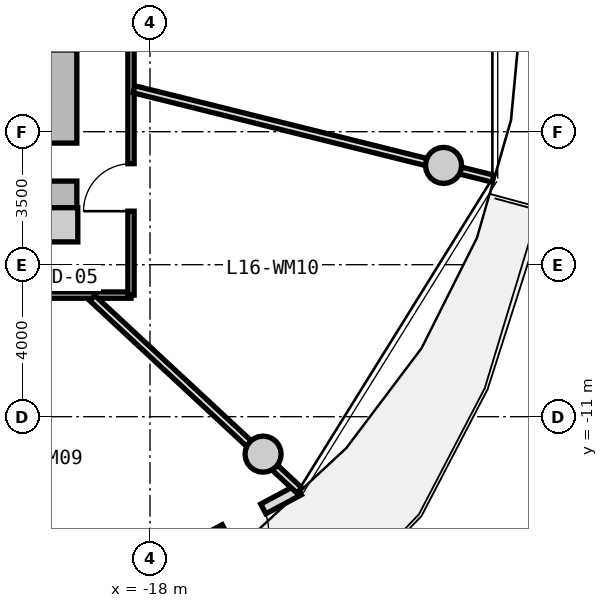
"""IFC4 building model, lengths in metres.
Left out: names, types, materials, properties, quantities, classifications, styles, units other than length and angle.
Written with IfcOpenShell. Run it as: python <this file> out.ifc"""

import sys

from ifc_helpers import new_model, si_unit, direction, frame, frame_2d, origin, origin_2d, place, context, subcontext, project, spatial, rectangle, circle, extrude, source, transform, mapped, element, fill, save


model = new_model("IFC4")
c1 = context("Model", 3, precision=1e-05, world=origin(), true_north=direction((0.0, 1.0)))
c2 = subcontext(c1, "Body", "Model", "MODEL_VIEW")
j1 = project(units=[si_unit("LENGTHUNIT", "METRE"), si_unit("PLANEANGLEUNIT", "RADIAN")], contexts=[c1])
p1 = place(None, origin())
s1 = spatial("IfcSite", under=j1, at=p1, CompositionType="ELEMENT")
p2 = place(p1, origin())
s2 = spatial("IfcBuilding", under=s1, at=p2, CompositionType="ELEMENT")
p3 = place(p2, frame((0.0, 0.0, 55.15)))
s3 = spatial("IfcBuildingStorey", under=s2, at=p3, CompositionType="ELEMENT", Elevation=55.15)
m1 = source(origin(), c2, "Body", "SweptSolid", [
    extrude(rectangle(XDim=0.9, YDim=0.9, at=origin_2d()), origin(), (0.0, 0.0, 1.0), 3.05),
])
p4 = place(p3, frame((-20.35, -5.95, 0.0), z_axis=(0.0, 0.0, 1.0), x_axis=(1.0, 0.0, 0.0)))
e1 = element("IfcColumn", 1, at=p4, inside=s3, PredefinedType="COLUMN", context=c2, shape_type="MappedRepresentation", body=[
    mapped(m1, transform((0.0, 0.0, 0.0), x_axis=(1.0, 0.0, 0.0), y_axis=(0.0, 1.0, 0.0), z_axis=(0.0, 0.0, 1.0), scale=1.0)),
])
m2 = source(origin(), c2, "Body", "SweptSolid", [
    extrude(rectangle(XDim=11.0, YDim=0.85, at=frame_2d((5.5, 0.0))), origin(), (0.0, 0.0, 1.0), 2.79),
])
p5 = place(p3, frame((-20.35, 5.5, 0.0), z_axis=(0.0, 0.0, 1.0), x_axis=(0.0, -1.0, 0.0)))
e2 = element("IfcWall", 2, at=p5, inside=s3, PredefinedType="SHEAR", context=c2, shape_type="MappedRepresentation", body=[
    mapped(m2, transform((0.0, 0.0, 0.0), x_axis=(1.0, 0.0, 0.0), y_axis=(0.0, 1.0, 0.0), z_axis=(0.0, 0.0, 1.0), scale=1.0)),
])
p6 = place(p5, frame((5.65, 0.0, 0.0)))
e3 = element("IfcOpeningElement", 3, at=p6, cuts=e2, PredefinedType="OPENING", context=c2, shape_type="SweptSolid", body=[
    extrude(rectangle(XDim=1.2, YDim=2.15, at=frame_2d((0.6, 1.075))), frame((0.0, 0.435, 0.0), z_axis=(0.0, -1.0, 0.0), x_axis=(1.0, 0.0, 0.0)), (0.0, 0.0, 1.0), 0.87),
])
p7 = place(p5, frame((9.3, 0.0, 0.0)))
e4 = element("IfcOpeningElement", 4, at=p7, cuts=e2, PredefinedType="OPENING", context=c2, shape_type="SweptSolid", body=[
    extrude(rectangle(XDim=1.0, YDim=2.1, at=frame_2d((0.5, 1.05))), frame((0.0, 0.435, 0.0), z_axis=(0.0, -1.0, 0.0), x_axis=(1.0, 0.0, 0.0)), (0.0, 0.0, 1.0), 0.87),
])
m3 = source(origin(), c2, "Body", "SweptSolid", [
    extrude(circle(Radius=0.475, at=origin_2d()), origin(), (0.0, 0.0, 1.0), 3.05),
])
for number, where, z_axis, x_axis in (
    (5, (-15.025, -11.985, 0.0), (0.0, 0.0, 1.0), (1.0, 0.0, 0.0)),
    (6, (-10.275, -4.387, 0.0), (0.0, 0.0, 1.0), (1.0, 0.0, 0.0)),
):
    element("IfcColumn", number, at=place(p3, frame(where, z_axis=z_axis, x_axis=x_axis)), inside=s3, PredefinedType="COLUMN", context=c2, shape_type="MappedRepresentation", body=[
        mapped(m3, transform((0.0, 0.0, 0.0), x_axis=(1.0, 0.0, 0.0), y_axis=(0.0, 1.0, 0.0), z_axis=(0.0, 0.0, 1.0), scale=1.0)),
    ])
m4 = source(origin(), c2, "Body", "SweptSolid", [
    extrude(rectangle(XDim=10.011, YDim=0.29, at=frame_2d((5.005, 0.0))), origin(), (0.0, 0.0, 1.0), 2.79),
])
p8 = place(p3, frame((-14.084, -12.926, 0.0), z_axis=(0.0, 0.0, 1.0), x_axis=(-0.881272505317, -0.472608475773, 0.0)))
e7 = element("IfcWall", 7, at=p8, inside=s3, PredefinedType="SOLIDWALL", context=c2, shape_type="MappedRepresentation", body=[
    mapped(m4, transform((0.0, 0.0, 0.0), x_axis=(1.0, 0.0, 0.0), y_axis=(0.0, 1.0, 0.0), z_axis=(0.0, 0.0, 1.0), scale=1.0)),
])
p9 = place(p8, frame((1.06, 0.0, 0.0)))
e8 = element("IfcOpeningElement", 8, at=p9, cuts=e7, PredefinedType="OPENING", context=c2, shape_type="SweptSolid", body=[
    extrude(rectangle(XDim=1.15, YDim=2.25, at=frame_2d((0.575, 1.125))), frame((0.0, 0.155, 0.0), z_axis=(0.0, -1.0, 0.0), x_axis=(1.0, 0.0, 0.0)), (0.0, 0.0, 1.0), 0.31),
])
p10 = place(p8, frame((5.355, 0.0, 0.85)))
e9 = element("IfcOpeningElement", 9, at=p10, cuts=e7, PredefinedType="OPENING", context=c2, shape_type="SweptSolid", body=[
    extrude(rectangle(XDim=1.2, YDim=1.5, at=frame_2d((0.6, 0.75))), frame((0.0, 0.155, 0.0), z_axis=(0.0, -1.0, 0.0), x_axis=(1.0, 0.0, 0.0)), (0.0, 0.0, 1.0), 0.31),
])
m5 = source(origin(), c2, "Body", "SweptSolid", [
    extrude(rectangle(XDim=19.0, YDim=0.165, at=frame_2d((9.5, 0.0))), origin(), (0.0, 0.0, 1.0), 2.775),
])
p11 = place(p3, frame((-18.5, -7.8, 0.0), z_axis=(0.0, 0.0, 1.0), x_axis=(-1.0, 0.0, 0.0)))
e10 = element("IfcWall", 10, at=p11, inside=s3, PredefinedType="PARTITIONING", context=c2, shape_type="MappedRepresentation", body=[
    mapped(m5, transform((0.0, 0.0, 0.0), x_axis=(1.0, 0.0, 0.0), y_axis=(0.0, 1.0, 0.0), z_axis=(0.0, 0.0, 1.0), scale=1.0)),
])
p12 = place(p11, frame((16.214, 0.0, 0.0)))
e11 = element("IfcOpeningElement", 11, at=p12, cuts=e10, PredefinedType="OPENING", context=c2, shape_type="SweptSolid", body=[
    extrude(rectangle(XDim=0.92, YDim=2.1, at=frame_2d((0.46, 1.05))), frame((0.0, 0.093, 0.0), z_axis=(0.0, -1.0, 0.0), x_axis=(1.0, 0.0, 0.0)), (0.0, 0.0, 1.0), 0.185),
])
p13 = place(p11, frame((13.063, 0.0, 0.0)))
e12 = element("IfcOpeningElement", 12, at=p13, cuts=e10, PredefinedType="OPENING", context=c2, shape_type="SweptSolid", body=[
    extrude(rectangle(XDim=0.92, YDim=2.1, at=frame_2d((0.46, 1.05))), frame((0.0, 0.093, 0.0), z_axis=(0.0, -1.0, 0.0), x_axis=(1.0, 0.0, 0.0)), (0.0, 0.0, 1.0), 0.185),
])
p14 = place(p11, frame((8.875, 0.0, 0.0)))
e13 = element("IfcOpeningElement", 13, at=p14, cuts=e10, PredefinedType="OPENING", context=c2, shape_type="SweptSolid", body=[
    extrude(rectangle(XDim=1.25, YDim=2.2, at=frame_2d((0.625, 1.1))), frame((0.0, 0.093, 0.0), z_axis=(0.0, -1.0, 0.0), x_axis=(1.0, 0.0, 0.0)), (0.0, 0.0, 1.0), 0.185),
])
p15 = place(p11, frame((3.506, 0.0, 0.0)))
e14 = element("IfcOpeningElement", 14, at=p15, cuts=e10, PredefinedType="OPENING", context=c2, shape_type="SweptSolid", body=[
    extrude(rectangle(XDim=1.25, YDim=2.2, at=frame_2d((0.625, 1.1))), frame((0.0, 0.093, 0.0), z_axis=(0.0, -1.0, 0.0), x_axis=(1.0, 0.0, 0.0)), (0.0, 0.0, 1.0), 0.185),
])
m6 = source(origin(), c2, "Body", "SweptSolid", [
    extrude(rectangle(XDim=15.6, YDim=0.165, at=frame_2d((7.8, 0.0))), origin(), (0.0, 0.0, 1.0), 2.775),
])
p16 = place(p3, frame((-18.5, 7.8, 0.0), z_axis=(0.0, 0.0, 1.0), x_axis=(0.0, -1.0, 0.0)))
e15 = element("IfcWall", 15, at=p16, inside=s3, PredefinedType="PARTITIONING", context=c2, shape_type="MappedRepresentation", body=[
    mapped(m6, transform((0.0, 0.0, 0.0), x_axis=(1.0, 0.0, 0.0), y_axis=(0.0, 1.0, 0.0), z_axis=(0.0, 0.0, 1.0), scale=1.0)),
])
p17 = place(p16, frame((12.141, 0.0, 0.0)))
e16 = element("IfcOpeningElement", 16, at=p17, cuts=e15, PredefinedType="OPENING", context=c2, shape_type="SweptSolid", body=[
    extrude(rectangle(XDim=1.25, YDim=2.2, at=frame_2d((0.625, 1.1))), frame((0.0, 0.093, 0.0), z_axis=(0.0, -1.0, 0.0), x_axis=(1.0, 0.0, 0.0)), (0.0, 0.0, 1.0), 0.185),
])
p18 = place(p16, frame((7.175, 0.0, 0.0)))
e17 = element("IfcOpeningElement", 17, at=p18, cuts=e15, PredefinedType="OPENING", context=c2, shape_type="SweptSolid", body=[
    extrude(rectangle(XDim=1.25, YDim=2.2, at=frame_2d((0.625, 1.1))), frame((0.0, 0.093, 0.0), z_axis=(0.0, -1.0, 0.0), x_axis=(1.0, 0.0, 0.0)), (0.0, 0.0, 1.0), 0.185),
])
p19 = place(p16, frame((2.826, 0.0, 0.0)))
e18 = element("IfcOpeningElement", 18, at=p19, cuts=e15, PredefinedType="OPENING", context=c2, shape_type="SweptSolid", body=[
    extrude(rectangle(XDim=1.05, YDim=2.15, at=frame_2d((0.525, 1.075))), frame((0.0, 0.093, 0.0), z_axis=(0.0, -1.0, 0.0), x_axis=(1.0, 0.0, 0.0)), (0.0, 0.0, 1.0), 0.185),
])
p20 = place(p16, frame((0.881, 0.0, 0.0)))
e19 = element("IfcOpeningElement", 19, at=p20, cuts=e15, PredefinedType="OPENING", context=c2, shape_type="SweptSolid", body=[
    extrude(rectangle(XDim=1.05, YDim=2.15, at=frame_2d((0.525, 1.075))), frame((0.0, 0.093, 0.0), z_axis=(0.0, -1.0, 0.0), x_axis=(1.0, 0.0, 0.0)), (0.0, 0.0, 1.0), 0.185),
])
m7 = source(origin(), c2, "Body", "SweptSolid", [
    extrude(rectangle(XDim=7.435, YDim=0.19, at=frame_2d((3.717, 0.0))), origin(), (0.0, 0.0, 1.0), 2.225),
])
p21 = place(p3, frame((-19.517, -7.88, 0.0), z_axis=(0.0, 0.0, 1.0), x_axis=(0.732651956848, -0.680603489652, 0.0)))
e20 = element("IfcWall", 20, at=p21, inside=s3, PredefinedType="PARTITIONING", context=c2, shape_type="MappedRepresentation", body=[
    mapped(m7, transform((0.0, 0.0, 0.0), x_axis=(1.0, 0.0, 0.0), y_axis=(0.0, 1.0, 0.0), z_axis=(0.0, 0.0, 1.0), scale=1.0)),
])
m8 = source(origin(), c2, "Body", "SweptSolid", [
    extrude(rectangle(XDim=9.737, YDim=0.19, at=frame_2d((4.869, 0.0))), origin(), (0.0, 0.0, 1.0), 2.225),
])
p22 = place(p3, frame((-18.42, -2.385, 0.0), z_axis=(0.0, 0.0, 1.0), x_axis=(0.970392716238, -0.241532557375, 0.0)))
e21 = element("IfcWall", 21, at=p22, inside=s3, PredefinedType="PARTITIONING", context=c2, shape_type="MappedRepresentation", body=[
    mapped(m8, transform((0.0, 0.0, 0.0), x_axis=(1.0, 0.0, 0.0), y_axis=(0.0, 1.0, 0.0), z_axis=(0.0, 0.0, 1.0), scale=1.0)),
])
m9 = source(origin(), c2, "Body", "SweptSolid", [
    extrude(rectangle(XDim=1.15, YDim=2.25, at=frame_2d((0.575, 1.125))), frame((0.0, 0.025, 0.0), z_axis=(0.0, -1.0, 0.0), x_axis=(1.0, 0.0, 0.0)), (0.0, 0.0, 1.0), 0.05),
])
p23 = place(p9, origin())
e22 = element("IfcDoor", 22, at=p23, inside=s3, OperationType="SINGLE_SWING_RIGHT", PredefinedType="DOOR", context=c2, shape_type="MappedRepresentation", body=[
    mapped(m9, transform((0.0, 0.0, 0.0), x_axis=(1.0, 0.0, 0.0), y_axis=(0.0, 1.0, 0.0), z_axis=(0.0, 0.0, 1.0), scale=1.0)),
])
fill(e8, e22)
m10 = source(origin(), c2, "Body", "SweptSolid", [
    extrude(rectangle(XDim=1.0, YDim=2.1, at=frame_2d((0.5, 1.05))), frame((0.0, 0.025, 0.0), z_axis=(0.0, -1.0, 0.0), x_axis=(1.0, 0.0, 0.0)), (0.0, 0.0, 1.0), 0.05),
])
p24 = place(p7, frame((1.0, 0.0, 0.0), z_axis=(0.0, 0.0, 1.0), x_axis=(-1.0, 0.0, 0.0)))
e23 = element("IfcDoor", 23, at=p24, inside=s3, OperationType="SINGLE_SWING_RIGHT", PredefinedType="DOOR", context=c2, shape_type="MappedRepresentation", body=[
    mapped(m10, transform((0.0, 0.0, 0.0), x_axis=(1.0, 0.0, 0.0), y_axis=(0.0, 1.0, 0.0), z_axis=(0.0, 0.0, 1.0), scale=1.0)),
])
fill(e4, e23)
m11 = source(origin(), c2, "Body", "SweptSolid", [
    extrude(rectangle(XDim=1.25, YDim=2.2, at=frame_2d((0.625, 1.1))), frame((0.0, 0.025, 0.0), z_axis=(0.0, -1.0, 0.0), x_axis=(1.0, 0.0, 0.0)), (0.0, 0.0, 1.0), 0.05),
])
p25 = place(p17, frame((1.25, 0.0, 0.0), z_axis=(0.0, 0.0, 1.0), x_axis=(-1.0, 0.0, 0.0)))
e24 = element("IfcDoor", 24, at=p25, inside=s3, OperationType="SINGLE_SWING_LEFT", PredefinedType="DOOR", context=c2, shape_type="MappedRepresentation", body=[
    mapped(m11, transform((0.0, 0.0, 0.0), x_axis=(1.0, 0.0, 0.0), y_axis=(0.0, 1.0, 0.0), z_axis=(0.0, 0.0, 1.0), scale=1.0)),
])
fill(e16, e24)
save(model, sys.argv[1])
